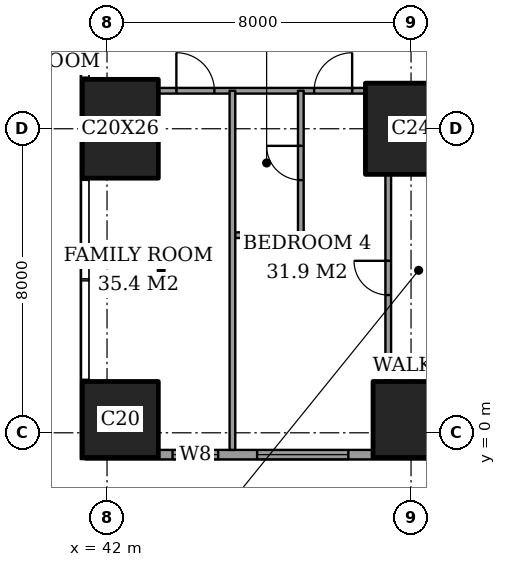
"""IFC4 building model, lengths in metres.
Left out: names, types, materials, properties, quantities, classifications, styles, units other than length and angle.
Written with IfcOpenShell. Run it as: python <this file> out.ifc"""

import sys

from ifc_helpers import new_model, si_unit, direction, frame, frame_2d, origin, origin_2d, place, context, subcontext, project, spatial, rectangle, extrude, element, fill, save


model = new_model("IFC4")
c1 = context("Model", 3, precision=1e-05, world=origin(), true_north=direction((0.0, 1.0)))
c2 = subcontext(c1, "Body", "Model", "MODEL_VIEW")
j1 = project(units=[si_unit("LENGTHUNIT", "METRE"), si_unit("PLANEANGLEUNIT", "RADIAN")], contexts=[c1])
p1 = place(None, origin())
s1 = spatial("IfcSite", under=j1, at=p1, CompositionType="ELEMENT")
p2 = place(p1, origin())
s2 = spatial("IfcBuilding", under=s1, at=p2, CompositionType="ELEMENT")
p3 = place(p2, frame((0.0, 0.0, 51.2)))
s3 = spatial("IfcBuildingStorey", under=s2, at=p3, CompositionType="ELEMENT", Elevation=51.2)
p4 = place(p3, frame((42.35, 0.35, 0.0), z_axis=(0.0, 0.0, 1.0), x_axis=(1.0, 0.0, 0.0)))
e1 = element("IfcColumn", 1, at=p4, inside=s3, PredefinedType="COLUMN", context=c2, shape_type="SweptSolid", body=[
    extrude(rectangle(XDim=2.0, YDim=2.0, at=origin_2d()), origin(), (0.0, 0.0, 1.0), 3.6),
])
p5 = place(p3, frame((42.35, 8.0, 0.0), z_axis=(0.0, 0.0, 1.0), x_axis=(1.0, 0.0, 0.0)))
e2 = element("IfcColumn", 2, at=p5, inside=s3, PredefinedType="COLUMN", context=c2, shape_type="SweptSolid", body=[
    extrude(rectangle(XDim=2.0, YDim=2.6, at=origin_2d()), origin(), (0.0, 0.0, 1.0), 3.6),
])
p6 = place(p3, frame((50.0, 0.35, 0.0), z_axis=(0.0, 0.0, 1.0), x_axis=(1.0, 0.0, 0.0)))
e3 = element("IfcColumn", 3, at=p6, inside=s3, PredefinedType="COLUMN", context=c2, shape_type="SweptSolid", body=[
    extrude(rectangle(XDim=2.0, YDim=2.0, at=origin_2d()), origin(), (0.0, 0.0, 1.0), 3.6),
])
p7 = place(p3, frame((50.0, 8.0, 0.0), z_axis=(0.0, 0.0, 1.0), x_axis=(1.0, 0.0, 0.0)))
e4 = element("IfcColumn", 4, at=p7, inside=s3, PredefinedType="COLUMN", context=c2, shape_type="SweptSolid", body=[
    extrude(rectangle(XDim=2.4, YDim=2.4, at=origin_2d()), origin(), (0.0, 0.0, 1.0), 3.6),
])
p8 = place(p3, frame((41.425, -0.575, 0.0), z_axis=(0.0, 0.0, 1.0), x_axis=(1.0, 0.0, 0.0)))
e5 = element("IfcWall", 5, at=p8, inside=s3, PredefinedType="SOLIDWALL", context=c2, shape_type="SweptSolid", body=[
    extrude(rectangle(XDim=21.4, YDim=0.25, at=frame_2d((10.7, 0.0))), origin(), (0.0, 0.0, 1.0), 3.6),
])
p9 = place(p8, frame((2.3, 0.0, 0.6)))
e6 = element("IfcOpeningElement", 6, at=p9, cuts=e5, PredefinedType="OPENING", context=c2, shape_type="SweptSolid", body=[
    extrude(rectangle(XDim=1.2, YDim=2.0, at=frame_2d((0.6, 1.0))), frame((0.0, 0.135, 0.0), z_axis=(0.0, -1.0, 0.0), x_axis=(1.0, 0.0, 0.0)), (0.0, 0.0, 1.0), 0.27),
])
p10 = place(p8, frame((4.525, 0.0, 0.6)))
e7 = element("IfcOpeningElement", 7, at=p10, cuts=e5, PredefinedType="OPENING", context=c2, shape_type="SweptSolid", body=[
    extrude(rectangle(XDim=2.4, YDim=2.0, at=frame_2d((1.2, 1.0))), frame((0.0, 0.135, 0.0), z_axis=(0.0, -1.0, 0.0), x_axis=(1.0, 0.0, 0.0)), (0.0, 0.0, 1.0), 0.27),
])
p11 = place(p8, frame((9.9, 0.0, 0.6)))
e8 = element("IfcOpeningElement", 8, at=p11, cuts=e5, PredefinedType="OPENING", context=c2, shape_type="SweptSolid", body=[
    extrude(rectangle(XDim=1.2, YDim=2.0, at=frame_2d((0.6, 1.0))), frame((0.0, 0.135, 0.0), z_axis=(0.0, -1.0, 0.0), x_axis=(1.0, 0.0, 0.0)), (0.0, 0.0, 1.0), 0.27),
])
p12 = place(p8, frame((12.225, 0.0, 0.6)))
e9 = element("IfcOpeningElement", 9, at=p12, cuts=e5, PredefinedType="OPENING", context=c2, shape_type="SweptSolid", body=[
    extrude(rectangle(XDim=2.4, YDim=2.0, at=frame_2d((1.2, 1.0))), frame((0.0, 0.135, 0.0), z_axis=(0.0, -1.0, 0.0), x_axis=(1.0, 0.0, 0.0)), (0.0, 0.0, 1.0), 0.27),
])
p13 = place(p8, frame((19.2, 0.0, 0.6)))
e10 = element("IfcOpeningElement", 10, at=p13, cuts=e5, PredefinedType="OPENING", context=c2, shape_type="SweptSolid", body=[
    extrude(rectangle(XDim=1.2, YDim=2.0, at=frame_2d((0.6, 1.0))), frame((0.0, 0.135, 0.0), z_axis=(0.0, -1.0, 0.0), x_axis=(1.0, 0.0, 0.0)), (0.0, 0.0, 1.0), 0.27),
])
p14 = place(p3, frame((45.3, 5.2, 0.0), z_axis=(0.0, 0.0, 1.0), x_axis=(1.0, 0.0, 0.0)))
e11 = element("IfcWall", 11, at=p14, inside=s3, PredefinedType="PARTITIONING", context=c2, shape_type="SweptSolid", body=[
    extrude(rectangle(XDim=1.8, YDim=0.15, at=frame_2d((0.9, 0.0))), origin(), (0.0, 0.0, 1.0), 3.35),
])
p15 = place(p3, frame((43.35, 9.0, 0.0), z_axis=(0.0, 0.0, 1.0), x_axis=(1.0, 0.0, 0.0)))
e12 = element("IfcWall", 12, at=p15, inside=s3, PredefinedType="PARTITIONING", context=c2, shape_type="SweptSolid", body=[
    extrude(rectangle(XDim=5.45, YDim=0.15, at=frame_2d((2.725, 0.0))), origin(), (0.0, 0.0, 1.0), 3.35),
])
p16 = place(p15, frame((4.1, 0.0, 0.0)))
e13 = element("IfcOpeningElement", 13, at=p16, cuts=e12, PredefinedType="OPENING", context=c2, shape_type="SweptSolid", body=[
    extrude(rectangle(XDim=1.0, YDim=2.1, at=frame_2d((0.5, 1.05))), frame((0.0, 0.085, 0.0), z_axis=(0.0, -1.0, 0.0), x_axis=(1.0, 0.0, 0.0)), (0.0, 0.0, 1.0), 0.17),
])
p17 = place(p15, frame((0.475, 0.0, 0.0)))
e14 = element("IfcOpeningElement", 14, at=p17, cuts=e12, PredefinedType="OPENING", context=c2, shape_type="SweptSolid", body=[
    extrude(rectangle(XDim=1.0, YDim=2.1, at=frame_2d((0.5, 1.05))), frame((0.0, 0.085, 0.0), z_axis=(0.0, -1.0, 0.0), x_axis=(1.0, 0.0, 0.0)), (0.0, 0.0, 1.0), 0.17),
])
p18 = place(p3, frame((45.3, -0.45, 0.0), z_axis=(0.0, 0.0, 1.0), x_axis=(0.0, 1.0, 0.0)))
e15 = element("IfcWall", 15, at=p18, inside=s3, PredefinedType="PARTITIONING", context=c2, shape_type="SweptSolid", body=[
    extrude(rectangle(XDim=9.45, YDim=0.15, at=frame_2d((4.725, 0.0))), origin(), (0.0, 0.0, 1.0), 3.35),
])
p19 = place(p3, frame((47.1, 5.2, 0.0), z_axis=(0.0, 0.0, 1.0), x_axis=(0.0, 1.0, 0.0)))
e16 = element("IfcWall", 16, at=p19, inside=s3, PredefinedType="PARTITIONING", context=c2, shape_type="SweptSolid", body=[
    extrude(rectangle(XDim=3.8, YDim=0.15, at=frame_2d((1.9, 0.0))), origin(), (0.0, 0.0, 1.0), 3.35),
])
p20 = place(p19, frame((1.45, 0.0, 0.0)))
e17 = element("IfcOpeningElement", 17, at=p20, cuts=e16, PredefinedType="OPENING", context=c2, shape_type="SweptSolid", body=[
    extrude(rectangle(XDim=0.9, YDim=2.1, at=frame_2d((0.45, 1.05))), frame((0.0, 0.085, 0.0), z_axis=(0.0, -1.0, 0.0), x_axis=(1.0, 0.0, 0.0)), (0.0, 0.0, 1.0), 0.17),
])
p21 = place(p3, frame((49.4, 1.35, 0.0), z_axis=(0.0, 0.0, 1.0), x_axis=(0.0, 1.0, 0.0)))
e18 = element("IfcWall", 18, at=p21, inside=s3, PredefinedType="PARTITIONING", context=c2, shape_type="SweptSolid", body=[
    extrude(rectangle(XDim=5.45, YDim=0.15, at=frame_2d((2.725, 0.0))), origin(), (0.0, 0.0, 1.0), 3.35),
])
p22 = place(p21, frame((2.275, 0.0, 0.0)))
e19 = element("IfcOpeningElement", 19, at=p22, cuts=e18, PredefinedType="OPENING", context=c2, shape_type="SweptSolid", body=[
    extrude(rectangle(XDim=0.9, YDim=2.1, at=frame_2d((0.45, 1.05))), frame((0.0, 0.085, 0.0), z_axis=(0.0, -1.0, 0.0), x_axis=(1.0, 0.0, 0.0)), (0.0, 0.0, 1.0), 0.17),
])
p23 = place(p9, origin())
e20 = element("IfcWindow", 20, at=p23, inside=s3, PartitioningType="SINGLE_PANEL", PredefinedType="WINDOW", context=c2, shape_type="SweptSolid", body=[
    extrude(rectangle(XDim=1.2, YDim=2.0, at=frame_2d((0.6, 1.0))), frame((0.0, 0.03, 0.0), z_axis=(0.0, -1.0, 0.0), x_axis=(1.0, 0.0, 0.0)), (0.0, 0.0, 1.0), 0.06),
])
fill(e6, e20)
p24 = place(p10, origin())
e21 = element("IfcWindow", 21, at=p24, inside=s3, PartitioningType="SINGLE_PANEL", PredefinedType="WINDOW", context=c2, shape_type="SweptSolid", body=[
    extrude(rectangle(XDim=2.4, YDim=2.0, at=frame_2d((1.2, 1.0))), frame((0.0, 0.03, 0.0), z_axis=(0.0, -1.0, 0.0), x_axis=(1.0, 0.0, 0.0)), (0.0, 0.0, 1.0), 0.06),
])
fill(e7, e21)
p25 = place(p22, origin())
e22 = element("IfcDoor", 22, at=p25, inside=s3, OperationType="SINGLE_SWING_LEFT", PredefinedType="DOOR", context=c2, shape_type="SweptSolid", body=[
    extrude(rectangle(XDim=0.9, YDim=2.1, at=frame_2d((0.45, 1.05))), frame((0.0, 0.025, 0.0), z_axis=(0.0, -1.0, 0.0), x_axis=(1.0, 0.0, 0.0)), (0.0, 0.0, 1.0), 0.05),
])
fill(e19, e22)
p26 = place(p20, origin())
e23 = element("IfcDoor", 23, at=p26, inside=s3, OperationType="SINGLE_SWING_LEFT", PredefinedType="DOOR", context=c2, shape_type="SweptSolid", body=[
    extrude(rectangle(XDim=0.9, YDim=2.1, at=frame_2d((0.45, 1.05))), frame((0.0, 0.025, 0.0), z_axis=(0.0, -1.0, 0.0), x_axis=(1.0, 0.0, 0.0)), (0.0, 0.0, 1.0), 0.05),
])
fill(e17, e23)
p27 = place(p16, origin())
e24 = element("IfcDoor", 24, at=p27, inside=s3, OperationType="SINGLE_SWING_LEFT", PredefinedType="DOOR", context=c2, shape_type="SweptSolid", body=[
    extrude(rectangle(XDim=1.0, YDim=2.1, at=frame_2d((0.5, 1.05))), frame((0.0, 0.025, 0.0), z_axis=(0.0, -1.0, 0.0), x_axis=(1.0, 0.0, 0.0)), (0.0, 0.0, 1.0), 0.05),
])
fill(e13, e24)
p28 = place(p17, origin())
e25 = element("IfcDoor", 25, at=p28, inside=s3, OperationType="SINGLE_SWING_RIGHT", PredefinedType="DOOR", context=c2, shape_type="SweptSolid", body=[
    extrude(rectangle(XDim=1.0, YDim=2.1, at=frame_2d((0.5, 1.05))), frame((0.0, 0.025, 0.0), z_axis=(0.0, -1.0, 0.0), x_axis=(1.0, 0.0, 0.0)), (0.0, 0.0, 1.0), 0.05),
])
fill(e14, e25)
save(model, sys.argv[1])
